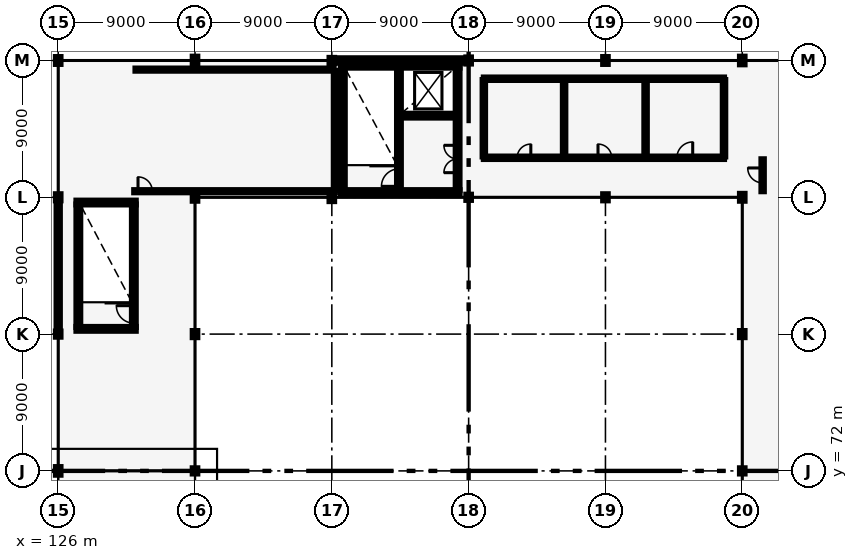
"""IFC4 building model, lengths in metres.
Left out: names, types, materials, properties, quantities, classifications, styles, units other than length and angle.
Written with IfcOpenShell. Run it as: python <this file> out.ifc"""

import sys

from ifc_helpers import new_model, si_unit, direction, frame, frame_2d, origin, origin_2d, place, context, subcontext, project, spatial, rectangle, i_section, extrude, element, fill, save


model = new_model("IFC4")
c1 = context("Model", 3, precision=1e-05, world=origin(), true_north=direction((0.0, 1.0)))
c2 = subcontext(c1, "Body", "Model", "MODEL_VIEW")
j1 = project(units=[si_unit("LENGTHUNIT", "METRE"), si_unit("PLANEANGLEUNIT", "RADIAN")], contexts=[c1])
p1 = place(None, origin())
s1 = spatial("IfcSite", under=j1, at=p1, CompositionType="ELEMENT")
p2 = place(p1, origin())
s2 = spatial("IfcBuilding", under=s1, at=p2, CompositionType="ELEMENT")
p3 = place(p2, frame((0.0, 0.0, 26.8)))
s3 = spatial("IfcBuildingStorey", under=s2, at=p3, CompositionType="ELEMENT", Elevation=26.8)
p4 = place(p3, frame((126.0, 72.0, 0.0), z_axis=(0.0, 0.0, 1.0), x_axis=(1.0, 0.0, 0.0)))
e1 = element("IfcColumn", 1, at=p4, inside=s3, PredefinedType="COLUMN", context=c2, shape_type="SweptSolid", body=[
    extrude(i_section(OverallWidth=0.3, OverallDepth=0.5, WebThickness=0.014, FlangeThickness=0.028, FilletRadius=0.027, at=origin_2d()), origin(), (0.0, 0.0, 1.0), 3.0),
])
p5 = place(p3, frame((126.0, 81.0, 0.0), z_axis=(0.0, 0.0, 1.0), x_axis=(1.0, 0.0, 0.0)))
e2 = element("IfcColumn", 2, at=p5, inside=s3, PredefinedType="COLUMN", context=c2, shape_type="SweptSolid", body=[
    extrude(i_section(OverallWidth=0.3, OverallDepth=0.34, WebThickness=0.012, FlangeThickness=0.021, FilletRadius=0.027, at=origin_2d()), origin(), (0.0, 0.0, 1.0), 3.0),
])
p6 = place(p3, frame((126.0, 90.0, 0.0), z_axis=(0.0, 0.0, 1.0), x_axis=(1.0, 0.0, 0.0)))
e3 = element("IfcColumn", 3, at=p6, inside=s3, PredefinedType="COLUMN", context=c2, shape_type="SweptSolid", body=[
    extrude(i_section(OverallWidth=0.3, OverallDepth=0.4, WebThickness=0.013, FlangeThickness=0.024, FilletRadius=0.027, at=origin_2d()), origin(), (0.0, 0.0, 1.0), 3.0),
])
p7 = place(p3, frame((126.0, 99.0, 0.0), z_axis=(0.0, 0.0, 1.0), x_axis=(1.0, 0.0, 0.0)))
e4 = element("IfcColumn", 4, at=p7, inside=s3, PredefinedType="COLUMN", context=c2, shape_type="SweptSolid", body=[
    extrude(i_section(OverallWidth=0.3, OverallDepth=0.45, WebThickness=0.014, FlangeThickness=0.026, FilletRadius=0.027, at=origin_2d()), origin(), (0.0, 0.0, 1.0), 3.0),
])
p8 = place(p3, frame((135.0, 72.0, 0.0), z_axis=(0.0, 0.0, 1.0), x_axis=(1.0, 0.0, 0.0)))
e5 = element("IfcColumn", 5, at=p8, inside=s3, PredefinedType="COLUMN", context=c2, shape_type="SweptSolid", body=[
    extrude(i_section(OverallWidth=0.3, OverallDepth=0.34, WebThickness=0.012, FlangeThickness=0.021, FilletRadius=0.027, at=origin_2d()), origin(), (0.0, 0.0, 1.0), 3.0),
])
p9 = place(p3, frame((135.0, 81.0, 0.0), z_axis=(0.0, 0.0, 1.0), x_axis=(1.0, 0.0, 0.0)))
e6 = element("IfcColumn", 6, at=p9, inside=s3, PredefinedType="COLUMN", context=c2, shape_type="SweptSolid", body=[
    extrude(i_section(OverallWidth=0.3, OverallDepth=0.4, WebThickness=0.013, FlangeThickness=0.024, FilletRadius=0.027, at=origin_2d()), origin(), (0.0, 0.0, 1.0), 3.0),
])
p10 = place(p3, frame((135.0, 90.0, 0.0), z_axis=(0.0, 0.0, 1.0), x_axis=(1.0, 0.0, 0.0)))
e7 = element("IfcColumn", 7, at=p10, inside=s3, PredefinedType="COLUMN", context=c2, shape_type="SweptSolid", body=[
    extrude(i_section(OverallWidth=0.3, OverallDepth=0.45, WebThickness=0.014, FlangeThickness=0.026, FilletRadius=0.027, at=origin_2d()), origin(), (0.0, 0.0, 1.0), 3.0),
])
for number, where, z_axis, x_axis in (
    (8, (135.0, 99.0, 0.0), (0.0, 0.0, 1.0), (1.0, 0.0, 0.0)),
    (9, (144.0, 90.0, 0.0), (0.0, 0.0, 1.0), (1.0, 0.0, 0.0)),
):
    element("IfcColumn", number, at=place(p3, frame(where, z_axis=z_axis, x_axis=x_axis)), inside=s3, PredefinedType="COLUMN", context=c2, shape_type="SweptSolid", body=[
        extrude(i_section(OverallWidth=0.3, OverallDepth=0.5, WebThickness=0.014, FlangeThickness=0.028, FilletRadius=0.027, at=origin_2d()), origin(), (0.0, 0.0, 1.0), 3.0),
    ])
for number, where, z_axis, x_axis in (
    (10, (144.0, 99.0, 0.0), (0.0, 0.0, 1.0), (1.0, 0.0, 0.0)),
    (11, (153.0, 90.0, 0.0), (0.0, 0.0, 1.0), (1.0, 0.0, 0.0)),
):
    element("IfcColumn", number, at=place(p3, frame(where, z_axis=z_axis, x_axis=x_axis)), inside=s3, PredefinedType="COLUMN", context=c2, shape_type="SweptSolid", body=[
        extrude(i_section(OverallWidth=0.3, OverallDepth=0.34, WebThickness=0.012, FlangeThickness=0.021, FilletRadius=0.027, at=origin_2d()), origin(), (0.0, 0.0, 1.0), 3.0),
    ])
for number, where, z_axis, x_axis in (
    (12, (153.0, 99.0, 0.0), (0.0, 0.0, 1.0), (1.0, 0.0, 0.0)),
    (13, (162.0, 90.0, 0.0), (0.0, 0.0, 1.0), (1.0, 0.0, 0.0)),
):
    element("IfcColumn", number, at=place(p3, frame(where, z_axis=z_axis, x_axis=x_axis)), inside=s3, PredefinedType="COLUMN", context=c2, shape_type="SweptSolid", body=[
        extrude(i_section(OverallWidth=0.3, OverallDepth=0.4, WebThickness=0.013, FlangeThickness=0.024, FilletRadius=0.027, at=origin_2d()), origin(), (0.0, 0.0, 1.0), 3.0),
    ])
p11 = place(p3, frame((162.0, 99.0, 0.0), z_axis=(0.0, 0.0, 1.0), x_axis=(1.0, 0.0, 0.0)))
e14 = element("IfcColumn", 14, at=p11, inside=s3, PredefinedType="COLUMN", context=c2, shape_type="SweptSolid", body=[
    extrude(i_section(OverallWidth=0.3, OverallDepth=0.45, WebThickness=0.014, FlangeThickness=0.026, FilletRadius=0.027, at=origin_2d()), origin(), (0.0, 0.0, 1.0), 3.0),
])
p12 = place(p3, frame((171.0, 72.0, 0.0), z_axis=(0.0, 0.0, 1.0), x_axis=(1.0, 0.0, 0.0)))
e15 = element("IfcColumn", 15, at=p12, inside=s3, PredefinedType="COLUMN", context=c2, shape_type="SweptSolid", body=[
    extrude(i_section(OverallWidth=0.3, OverallDepth=0.34, WebThickness=0.012, FlangeThickness=0.021, FilletRadius=0.027, at=origin_2d()), origin(), (0.0, 0.0, 1.0), 3.0),
])
p13 = place(p3, frame((171.0, 81.0, 0.0), z_axis=(0.0, 0.0, 1.0), x_axis=(1.0, 0.0, 0.0)))
e16 = element("IfcColumn", 16, at=p13, inside=s3, PredefinedType="COLUMN", context=c2, shape_type="SweptSolid", body=[
    extrude(i_section(OverallWidth=0.3, OverallDepth=0.4, WebThickness=0.013, FlangeThickness=0.024, FilletRadius=0.027, at=origin_2d()), origin(), (0.0, 0.0, 1.0), 3.0),
])
p14 = place(p3, frame((171.0, 90.0, 0.0), z_axis=(0.0, 0.0, 1.0), x_axis=(1.0, 0.0, 0.0)))
e17 = element("IfcColumn", 17, at=p14, inside=s3, PredefinedType="COLUMN", context=c2, shape_type="SweptSolid", body=[
    extrude(i_section(OverallWidth=0.3, OverallDepth=0.45, WebThickness=0.014, FlangeThickness=0.026, FilletRadius=0.027, at=origin_2d()), origin(), (0.0, 0.0, 1.0), 3.0),
])
p15 = place(p3, frame((171.0, 99.0, 0.0), z_axis=(0.0, 0.0, 1.0), x_axis=(1.0, 0.0, 0.0)))
e18 = element("IfcColumn", 18, at=p15, inside=s3, PredefinedType="COLUMN", context=c2, shape_type="SweptSolid", body=[
    extrude(i_section(OverallWidth=0.3, OverallDepth=0.5, WebThickness=0.014, FlangeThickness=0.028, FilletRadius=0.027, at=origin_2d()), origin(), (0.0, 0.0, 1.0), 3.0),
])
p16 = place(p3, frame((126.0, 81.165, 0.0), z_axis=(0.0, 0.0, 1.0), x_axis=(0.0, 1.0, 0.0)))
e19 = element("IfcWall", 19, at=p16, inside=s3, PredefinedType="SOLIDWALL", context=c2, shape_type="SweptSolid", body=[
    extrude(rectangle(XDim=8.64, YDim=0.215, at=frame_2d((4.32, 0.0))), origin(), (0.0, 0.0, 1.0), 1.9),
])
p17 = place(p3, frame((144.145, 99.0, 0.0), z_axis=(0.0, 0.0, 1.0), x_axis=(1.0, 0.0, 0.0)))
e20 = element("IfcWall", 20, at=p17, inside=s3, PredefinedType="SOLIDWALL", context=c2, shape_type="SweptSolid", body=[
    extrude(rectangle(XDim=8.71, YDim=0.29, at=frame_2d((4.355, 0.0))), origin(), (0.0, 0.0, 1.0), 1.9),
])
p18 = place(p3, frame((144.725, 90.47, 0.0), z_axis=(0.0, 0.0, 1.0), x_axis=(0.0, 1.0, 0.0)))
e21 = element("IfcWall", 21, at=p18, inside=s3, PredefinedType="SHEAR", context=c2, shape_type="SweptSolid", body=[
    extrude(rectangle(XDim=8.06, YDim=0.25, at=frame_2d((4.03, 0.0))), origin(), (0.0, 0.0, 1.0), 2.64),
])
p19 = place(p3, frame((152.275, 90.47, 0.0), z_axis=(0.0, 0.0, 1.0), x_axis=(0.0, 1.0, 0.0)))
e22 = element("IfcWall", 22, at=p19, inside=s3, PredefinedType="SHEAR", context=c2, shape_type="SweptSolid", body=[
    extrude(rectangle(XDim=8.06, YDim=0.25, at=frame_2d((4.03, 0.0))), origin(), (0.0, 0.0, 1.0), 2.64),
])
p20 = place(p19, frame((1.15, 0.0, 0.0)))
e23 = element("IfcOpeningElement", 23, at=p20, cuts=e22, PredefinedType="OPENING", context=c2, shape_type="SweptSolid", body=[
    extrude(rectangle(XDim=1.8, YDim=2.2, at=frame_2d((0.9, 1.1))), frame((0.0, 0.135, 0.0), z_axis=(0.0, -1.0, 0.0), x_axis=(1.0, 0.0, 0.0)), (0.0, 0.0, 1.0), 0.27),
])
for number, where, z_axis, x_axis in (
    (24, (144.6, 90.345, 0.0), (0.0, 0.0, 1.0), (1.0, 0.0, 0.0)),
    (25, (144.6, 98.655, 0.0), (0.0, 0.0, 1.0), (1.0, 0.0, 0.0)),
):
    element("IfcWall", number, at=place(p3, frame(where, z_axis=z_axis, x_axis=x_axis)), inside=s3, PredefinedType="SHEAR", context=c2, shape_type="SweptSolid", body=[
        extrude(rectangle(XDim=7.8, YDim=0.25, at=frame_2d((3.9, 0.0))), origin(), (0.0, 0.0, 1.0), 2.64),
    ])
p21 = place(p3, frame((148.415, 90.47, 0.0), z_axis=(0.0, 0.0, 1.0), x_axis=(0.0, 1.0, 0.0)))
e26 = element("IfcWall", 26, at=p21, inside=s3, PredefinedType="SHEAR", context=c2, shape_type="SweptSolid", body=[
    extrude(rectangle(XDim=8.06, YDim=0.25, at=frame_2d((4.03, 0.0))), origin(), (0.0, 0.0, 1.0), 2.64),
])
p22 = place(p21, frame((0.25, 0.0, 0.0)))
e27 = element("IfcOpeningElement", 27, at=p22, cuts=e26, PredefinedType="OPENING", context=c2, shape_type="SweptSolid", body=[
    extrude(rectangle(XDim=1.15, YDim=2.15, at=frame_2d((0.575, 1.075))), frame((0.0, 0.135, 0.0), z_axis=(0.0, -1.0, 0.0), x_axis=(1.0, 0.0, 0.0)), (0.0, 0.0, 1.0), 0.27),
])
p23 = place(p3, frame((148.54, 95.37, 0.0), z_axis=(0.0, 0.0, 1.0), x_axis=(1.0, 0.0, 0.0)))
e28 = element("IfcWall", 28, at=p23, inside=s3, PredefinedType="SHEAR", context=c2, shape_type="SweptSolid", body=[
    extrude(rectangle(XDim=3.61, YDim=0.25, at=frame_2d((1.805, 0.0))), origin(), (0.0, 0.0, 1.0), 2.64),
])
p24 = place(p23, frame((1.0, 0.0, 0.0)))
e29 = element("IfcOpeningElement", 29, at=p24, cuts=e28, PredefinedType="OPENING", context=c2, shape_type="SweptSolid", body=[
    extrude(rectangle(XDim=1.1, YDim=2.1, at=frame_2d((0.55, 1.05))), frame((0.0, 0.135, 0.0), z_axis=(0.0, -1.0, 0.0), x_axis=(1.0, 0.0, 0.0)), (0.0, 0.0, 1.0), 0.27),
])
p25 = place(p3, frame((127.325, 81.47, 0.0), z_axis=(0.0, 0.0, 1.0), x_axis=(0.0, 1.0, 0.0)))
e30 = element("IfcWall", 30, at=p25, inside=s3, PredefinedType="SHEAR", context=c2, shape_type="SweptSolid", body=[
    extrude(rectangle(XDim=8.06, YDim=0.25, at=frame_2d((4.03, 0.0))), origin(), (0.0, 0.0, 1.0), 2.64),
])
p26 = place(p3, frame((130.975, 81.47, 0.0), z_axis=(0.0, 0.0, 1.0), x_axis=(0.0, 1.0, 0.0)))
e31 = element("IfcWall", 31, at=p26, inside=s3, PredefinedType="SHEAR", context=c2, shape_type="SweptSolid", body=[
    extrude(rectangle(XDim=8.06, YDim=0.25, at=frame_2d((4.03, 0.0))), origin(), (0.0, 0.0, 1.0), 2.64),
])
p27 = place(p26, frame((0.25, 0.0, 0.0)))
e32 = element("IfcOpeningElement", 32, at=p27, cuts=e31, PredefinedType="OPENING", context=c2, shape_type="SweptSolid", body=[
    extrude(rectangle(XDim=1.15, YDim=2.15, at=frame_2d((0.575, 1.075))), frame((0.0, 0.135, 0.0), z_axis=(0.0, -1.0, 0.0), x_axis=(1.0, 0.0, 0.0)), (0.0, 0.0, 1.0), 0.27),
])
for number, where, z_axis, x_axis in (
    (33, (127.2, 81.345, 0.0), (0.0, 0.0, 1.0), (1.0, 0.0, 0.0)),
    (34, (127.2, 89.655, 0.0), (0.0, 0.0, 1.0), (1.0, 0.0, 0.0)),
):
    element("IfcWall", number, at=place(p3, frame(where, z_axis=z_axis, x_axis=x_axis)), inside=s3, PredefinedType="SHEAR", context=c2, shape_type="SweptSolid", body=[
        extrude(rectangle(XDim=3.9, YDim=0.25, at=frame_2d((1.95, 0.0))), origin(), (0.0, 0.0, 1.0), 2.64),
    ])
p28 = place(p3, frame((154.0, 92.6, 0.0), z_axis=(0.0, 0.0, 1.0), x_axis=(1.0, 0.0, 0.0)))
e35 = element("IfcWall", 35, at=p28, inside=s3, PredefinedType="PLUMBINGWALL", context=c2, shape_type="SweptSolid", body=[
    extrude(rectangle(XDim=15.8, YDim=0.16, at=frame_2d((7.9, 0.0))), origin(), (0.0, 0.0, 1.0), 2.35),
])
p29 = place(p28, frame((2.19, 0.0, 0.0)))
e36 = element("IfcOpeningElement", 36, at=p29, cuts=e35, PredefinedType="OPENING", context=c2, shape_type="SweptSolid", body=[
    extrude(rectangle(XDim=0.9, YDim=2.1, at=frame_2d((0.45, 1.05))), frame((0.0, 0.09, 0.0), z_axis=(0.0, -1.0, 0.0), x_axis=(1.0, 0.0, 0.0)), (0.0, 0.0, 1.0), 0.18),
])
p30 = place(p28, frame((7.51, 0.0, 0.0)))
e37 = element("IfcOpeningElement", 37, at=p30, cuts=e35, PredefinedType="OPENING", context=c2, shape_type="SweptSolid", body=[
    extrude(rectangle(XDim=0.9, YDim=2.1, at=frame_2d((0.45, 1.05))), frame((0.0, 0.09, 0.0), z_axis=(0.0, -1.0, 0.0), x_axis=(1.0, 0.0, 0.0)), (0.0, 0.0, 1.0), 0.18),
])
p31 = place(p28, frame((12.7, 0.0, 0.0)))
e38 = element("IfcOpeningElement", 38, at=p31, cuts=e35, PredefinedType="OPENING", context=c2, shape_type="SweptSolid", body=[
    extrude(rectangle(XDim=1.04, YDim=2.15, at=frame_2d((0.52, 1.075))), frame((0.0, 0.09, 0.0), z_axis=(0.0, -1.0, 0.0), x_axis=(1.0, 0.0, 0.0)), (0.0, 0.0, 1.0), 0.18),
])
p32 = place(p3, frame((154.0, 97.8, 0.0), z_axis=(0.0, 0.0, 1.0), x_axis=(1.0, 0.0, 0.0)))
e39 = element("IfcWall", 39, at=p32, inside=s3, PredefinedType="PLUMBINGWALL", context=c2, shape_type="SweptSolid", body=[
    extrude(rectangle(XDim=15.8, YDim=0.16, at=frame_2d((7.9, 0.0))), origin(), (0.0, 0.0, 1.0), 2.35),
])
for number, where, z_axis, x_axis in (
    (40, (154.0, 92.688, 0.0), (0.0, 0.0, 1.0), (0.0, 1.0, 0.0)),
    (41, (159.28, 92.688, 0.0), (0.0, 0.0, 1.0), (0.0, 1.0, 0.0)),
    (42, (164.64, 92.688, 0.0), (0.0, 0.0, 1.0), (0.0, 1.0, 0.0)),
    (43, (169.8, 92.688, 0.0), (0.0, 0.0, 1.0), (0.0, 1.0, 0.0)),
):
    element("IfcWall", number, at=place(p3, frame(where, z_axis=z_axis, x_axis=x_axis)), inside=s3, PredefinedType="PLUMBINGWALL", context=c2, shape_type="SweptSolid", body=[
        extrude(rectangle(XDim=5.024, YDim=0.16, at=frame_2d((2.512, 0.0))), origin(), (0.0, 0.0, 1.0), 2.35),
    ])
p33 = place(p3, frame((172.34, 90.4, 0.0), z_axis=(0.0, 0.0, 1.0), x_axis=(0.0, 1.0, 0.0)))
e44 = element("IfcWall", 44, at=p33, inside=s3, PredefinedType="PARTITIONING", context=c2, shape_type="SweptSolid", body=[
    extrude(rectangle(XDim=2.1, YDim=0.155, at=frame_2d((1.05, 0.0))), origin(), (0.0, 0.0, 1.0), 2.35),
])
p34 = place(p33, frame((0.55, 0.0, 0.0)))
e45 = element("IfcOpeningElement", 45, at=p34, cuts=e44, PredefinedType="OPENING", context=c2, shape_type="SweptSolid", body=[
    extrude(rectangle(XDim=0.98, YDim=2.12, at=frame_2d((0.49, 1.06))), frame((0.0, 0.087, 0.0), z_axis=(0.0, -1.0, 0.0), x_axis=(1.0, 0.0, 0.0)), (0.0, 0.0, 1.0), 0.175),
])
p35 = place(p3, frame((131.0, 90.4, 0.0), z_axis=(0.0, 0.0, 1.0), x_axis=(1.0, 0.0, 0.0)))
e46 = element("IfcWall", 46, at=p35, inside=s3, PredefinedType="PARTITIONING", context=c2, shape_type="SweptSolid", body=[
    extrude(rectangle(XDim=13.2, YDim=0.14, at=frame_2d((6.6, 0.0))), origin(), (0.0, 0.0, 1.0), 2.35),
])
p36 = place(p35, frame((0.25, 0.0, 0.0)))
e47 = element("IfcOpeningElement", 47, at=p36, cuts=e46, PredefinedType="OPENING", context=c2, shape_type="SweptSolid", body=[
    extrude(rectangle(XDim=0.94, YDim=2.1, at=frame_2d((0.47, 1.05))), frame((0.0, 0.08, 0.0), z_axis=(0.0, -1.0, 0.0), x_axis=(1.0, 0.0, 0.0)), (0.0, 0.0, 1.0), 0.16),
])
p37 = place(p3, frame((131.084, 98.4, 0.0), z_axis=(0.0, 0.0, 1.0), x_axis=(1.0, 0.0, 0.0)))
e48 = element("IfcWall", 48, at=p37, inside=s3, PredefinedType="PARTITIONING", context=c2, shape_type="SweptSolid", body=[
    extrude(rectangle(XDim=13.032, YDim=0.14, at=frame_2d((6.516, 0.0))), origin(), (0.0, 0.0, 1.0), 2.35),
])
p38 = place(p3, frame((144.2, 90.484, 0.0), z_axis=(0.0, 0.0, 1.0), x_axis=(0.0, 1.0, 0.0)))
e49 = element("IfcWall", 49, at=p38, inside=s3, PredefinedType="PARTITIONING", context=c2, shape_type="SweptSolid", body=[
    extrude(rectangle(XDim=7.832, YDim=0.14, at=frame_2d((3.916, 0.0))), origin(), (0.0, 0.0, 1.0), 2.35),
])
p39 = place(p22, origin())
e50 = element("IfcDoor", 50, at=p39, inside=s3, OperationType="SINGLE_SWING_LEFT", PredefinedType="DOOR", context=c2, shape_type="SweptSolid", body=[
    extrude(rectangle(XDim=1.15, YDim=2.15, at=frame_2d((0.575, 1.075))), frame((0.0, 0.025, 0.0), z_axis=(0.0, -1.0, 0.0), x_axis=(1.0, 0.0, 0.0)), (0.0, 0.0, 1.0), 0.05),
])
fill(e27, e50)
p40 = place(p24, origin())
e51 = element("IfcDoor", 51, at=p40, inside=s3, OperationType="DOUBLE_DOOR_SLIDING", PredefinedType="DOOR", context=c2, shape_type="SweptSolid", body=[
    extrude(rectangle(XDim=1.1, YDim=2.1, at=frame_2d((0.55, 1.05))), frame((0.0, 0.025, 0.0), z_axis=(0.0, -1.0, 0.0), x_axis=(1.0, 0.0, 0.0)), (0.0, 0.0, 1.0), 0.05),
])
fill(e29, e51)
p41 = place(p20, origin())
e52 = element("IfcDoor", 52, at=p41, inside=s3, OperationType="DOUBLE_DOOR_SINGLE_SWING", PredefinedType="DOOR", context=c2, shape_type="SweptSolid", body=[
    extrude(rectangle(XDim=1.8, YDim=2.2, at=frame_2d((0.9, 1.1))), frame((0.0, 0.025, 0.0), z_axis=(0.0, -1.0, 0.0), x_axis=(1.0, 0.0, 0.0)), (0.0, 0.0, 1.0), 0.05),
])
fill(e23, e52)
p42 = place(p27, origin())
e53 = element("IfcDoor", 53, at=p42, inside=s3, OperationType="SINGLE_SWING_RIGHT", PredefinedType="DOOR", context=c2, shape_type="SweptSolid", body=[
    extrude(rectangle(XDim=1.15, YDim=2.15, at=frame_2d((0.575, 1.075))), frame((0.0, 0.025, 0.0), z_axis=(0.0, -1.0, 0.0), x_axis=(1.0, 0.0, 0.0)), (0.0, 0.0, 1.0), 0.05),
])
fill(e32, e53)
p43 = place(p29, origin())
e54 = element("IfcDoor", 54, at=p43, inside=s3, OperationType="SINGLE_SWING_RIGHT", PredefinedType="DOOR", context=c2, shape_type="SweptSolid", body=[
    extrude(rectangle(XDim=0.9, YDim=2.1, at=frame_2d((0.45, 1.05))), frame((0.0, 0.025, 0.0), z_axis=(0.0, -1.0, 0.0), x_axis=(1.0, 0.0, 0.0)), (0.0, 0.0, 1.0), 0.05),
])
fill(e36, e54)
p44 = place(p30, origin())
e55 = element("IfcDoor", 55, at=p44, inside=s3, OperationType="SINGLE_SWING_LEFT", PredefinedType="DOOR", context=c2, shape_type="SweptSolid", body=[
    extrude(rectangle(XDim=0.9, YDim=2.1, at=frame_2d((0.45, 1.05))), frame((0.0, 0.025, 0.0), z_axis=(0.0, -1.0, 0.0), x_axis=(1.0, 0.0, 0.0)), (0.0, 0.0, 1.0), 0.05),
])
fill(e37, e55)
p45 = place(p31, origin())
e56 = element("IfcDoor", 56, at=p45, inside=s3, OperationType="SINGLE_SWING_RIGHT", PredefinedType="DOOR", context=c2, shape_type="SweptSolid", body=[
    extrude(rectangle(XDim=1.04, YDim=2.15, at=frame_2d((0.52, 1.075))), frame((0.0, 0.025, 0.0), z_axis=(0.0, -1.0, 0.0), x_axis=(1.0, 0.0, 0.0)), (0.0, 0.0, 1.0), 0.05),
])
fill(e38, e56)
p46 = place(p34, origin())
e57 = element("IfcDoor", 57, at=p46, inside=s3, OperationType="SINGLE_SWING_RIGHT", PredefinedType="DOOR", context=c2, shape_type="SweptSolid", body=[
    extrude(rectangle(XDim=0.98, YDim=2.12, at=frame_2d((0.49, 1.06))), frame((0.0, 0.025, 0.0), z_axis=(0.0, -1.0, 0.0), x_axis=(1.0, 0.0, 0.0)), (0.0, 0.0, 1.0), 0.05),
])
fill(e45, e57)
p47 = place(p36, origin())
e58 = element("IfcDoor", 58, at=p47, inside=s3, OperationType="SINGLE_SWING_LEFT", PredefinedType="DOOR", context=c2, shape_type="SweptSolid", body=[
    extrude(rectangle(XDim=0.94, YDim=2.1, at=frame_2d((0.47, 1.05))), frame((0.0, 0.025, 0.0), z_axis=(0.0, -1.0, 0.0), x_axis=(1.0, 0.0, 0.0)), (0.0, 0.0, 1.0), 0.05),
])
fill(e47, e58)
save(model, sys.argv[1])
